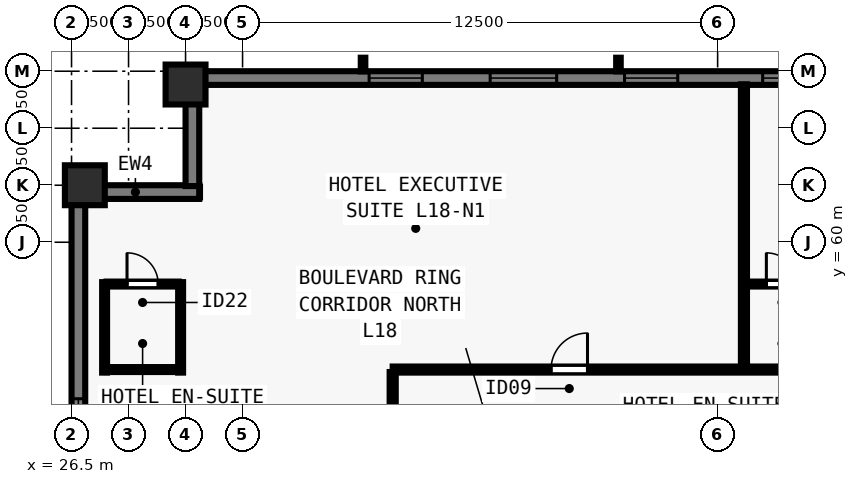
"""IFC4 building model, lengths in metres.
Left out: names, types, materials, properties, quantities, classifications, styles, units other than length and angle.
Written with IfcOpenShell. Run it as: python <this file> out.ifc"""

import sys

from ifc_helpers import new_model, si_unit, direction, frame, frame_2d, origin, origin_2d, place, context, subcontext, project, spatial, rectangle, extrude, element, fill, save


model = new_model("IFC4")
c1 = context("Model", 3, precision=1e-05, world=origin(), true_north=direction((0.0, 1.0)))
c2 = subcontext(c1, "Body", "Model", "MODEL_VIEW")
j1 = project(units=[si_unit("LENGTHUNIT", "METRE"), si_unit("PLANEANGLEUNIT", "RADIAN")], contexts=[c1])
p1 = place(None, origin())
s1 = spatial("IfcSite", under=j1, at=p1, CompositionType="ELEMENT")
p2 = place(p1, origin())
s2 = spatial("IfcBuilding", under=s1, at=p2, CompositionType="ELEMENT")
p3 = place(p2, frame((0.0, 0.0, 69.0)))
s3 = spatial("IfcBuildingStorey", under=s2, at=p3, CompositionType="ELEMENT", Elevation=69.0)
for number, where, z_axis, x_axis in (
    (1, (29.5, 64.15, 0.0), (0.0, 0.0, 1.0), (1.0, 0.0, 0.0)),
    (2, (26.85, 61.5, 0.0), (0.0, 0.0, 1.0), (0.0, 1.0, 0.0)),
):
    element("IfcColumn", number, at=place(p3, frame(where, z_axis=z_axis, x_axis=x_axis)), inside=s3, PredefinedType="COLUMN", context=c2, shape_type="SweptSolid", body=[
        extrude(rectangle(XDim=1.05, YDim=1.05, at=origin_2d()), origin(), (0.0, 0.0, 1.0), 3.5),
    ])
p4 = place(p3, frame((26.68, 16.5, 0.0), z_axis=(0.0, 0.0, 1.0), x_axis=(0.0, 1.0, 0.0)))
e3 = element("IfcWall", 3, at=p4, inside=s3, PredefinedType="SOLIDWALL", context=c2, shape_type="SweptSolid", body=[
    extrude(rectangle(XDim=44.662, YDim=0.36, at=frame_2d((22.331, 0.0))), origin(), (0.0, 0.0, 1.0), 3.28),
])
p5 = place(p4, frame((5.28, 0.0, 0.8)))
e4 = element("IfcOpeningElement", 4, at=p5, cuts=e3, PredefinedType="OPENING", context=c2, shape_type="SweptSolid", body=[
    extrude(rectangle(XDim=1.4, YDim=1.544, at=frame_2d((0.7, 0.772))), frame((0.0, 0.19, 0.0), z_axis=(0.0, -1.0, 0.0), x_axis=(1.0, 0.0, 0.0)), (0.0, 0.0, 1.0), 0.38),
])
p6 = place(p4, frame((8.015, 0.0, 0.8)))
e5 = element("IfcOpeningElement", 5, at=p6, cuts=e3, PredefinedType="OPENING", context=c2, shape_type="SweptSolid", body=[
    extrude(rectangle(XDim=1.75, YDim=1.544, at=frame_2d((0.875, 0.772))), frame((0.0, 0.19, 0.0), z_axis=(0.0, -1.0, 0.0), x_axis=(1.0, 0.0, 0.0)), (0.0, 0.0, 1.0), 0.38),
])
p7 = place(p4, frame((11.551, 0.0, 0.8)))
e6 = element("IfcOpeningElement", 6, at=p7, cuts=e3, PredefinedType="OPENING", context=c2, shape_type="SweptSolid", body=[
    extrude(rectangle(XDim=1.4, YDim=1.544, at=frame_2d((0.7, 0.772))), frame((0.0, 0.19, 0.0), z_axis=(0.0, -1.0, 0.0), x_axis=(1.0, 0.0, 0.0)), (0.0, 0.0, 1.0), 0.38),
])
p8 = place(p4, frame((14.736, 0.0, 0.8)))
e7 = element("IfcOpeningElement", 7, at=p8, cuts=e3, PredefinedType="OPENING", context=c2, shape_type="SweptSolid", body=[
    extrude(rectangle(XDim=1.75, YDim=1.544, at=frame_2d((0.875, 0.772))), frame((0.0, 0.19, 0.0), z_axis=(0.0, -1.0, 0.0), x_axis=(1.0, 0.0, 0.0)), (0.0, 0.0, 1.0), 0.38),
])
p9 = place(p4, frame((18.721, 0.0, 0.8)))
e8 = element("IfcOpeningElement", 8, at=p9, cuts=e3, PredefinedType="OPENING", context=c2, shape_type="SweptSolid", body=[
    extrude(rectangle(XDim=1.4, YDim=1.544, at=frame_2d((0.7, 0.772))), frame((0.0, 0.19, 0.0), z_axis=(0.0, -1.0, 0.0), x_axis=(1.0, 0.0, 0.0)), (0.0, 0.0, 1.0), 0.38),
])
p10 = place(p4, frame((22.706, 0.0, 0.8)))
e9 = element("IfcOpeningElement", 9, at=p10, cuts=e3, PredefinedType="OPENING", context=c2, shape_type="SweptSolid", body=[
    extrude(rectangle(XDim=1.75, YDim=1.544, at=frame_2d((0.875, 0.772))), frame((0.0, 0.19, 0.0), z_axis=(0.0, -1.0, 0.0), x_axis=(1.0, 0.0, 0.0)), (0.0, 0.0, 1.0), 0.38),
])
p11 = place(p4, frame((24.991, 0.0, 0.8)))
e10 = element("IfcOpeningElement", 10, at=p11, cuts=e3, PredefinedType="OPENING", context=c2, shape_type="SweptSolid", body=[
    extrude(rectangle(XDim=1.4, YDim=1.544, at=frame_2d((0.7, 0.772))), frame((0.0, 0.19, 0.0), z_axis=(0.0, -1.0, 0.0), x_axis=(1.0, 0.0, 0.0)), (0.0, 0.0, 1.0), 0.38),
])
p12 = place(p4, frame((28.177, 0.0, 0.8)))
e11 = element("IfcOpeningElement", 11, at=p12, cuts=e3, PredefinedType="OPENING", context=c2, shape_type="SweptSolid", body=[
    extrude(rectangle(XDim=1.75, YDim=1.544, at=frame_2d((0.875, 0.772))), frame((0.0, 0.19, 0.0), z_axis=(0.0, -1.0, 0.0), x_axis=(1.0, 0.0, 0.0)), (0.0, 0.0, 1.0), 0.38),
])
p13 = place(p4, frame((31.711, 0.0, 0.8)))
e12 = element("IfcOpeningElement", 12, at=p13, cuts=e3, PredefinedType="OPENING", context=c2, shape_type="SweptSolid", body=[
    extrude(rectangle(XDim=1.4, YDim=1.544, at=frame_2d((0.7, 0.772))), frame((0.0, 0.19, 0.0), z_axis=(0.0, -1.0, 0.0), x_axis=(1.0, 0.0, 0.0)), (0.0, 0.0, 1.0), 0.38),
])
p14 = place(p4, frame((34.897, 0.0, 0.8)))
e13 = element("IfcOpeningElement", 13, at=p14, cuts=e3, PredefinedType="OPENING", context=c2, shape_type="SweptSolid", body=[
    extrude(rectangle(XDim=1.75, YDim=1.544, at=frame_2d((0.875, 0.772))), frame((0.0, 0.19, 0.0), z_axis=(0.0, -1.0, 0.0), x_axis=(1.0, 0.0, 0.0)), (0.0, 0.0, 1.0), 0.38),
])
p15 = place(p4, frame((37.982, 0.0, 0.8)))
e14 = element("IfcOpeningElement", 14, at=p15, cuts=e3, PredefinedType="OPENING", context=c2, shape_type="SweptSolid", body=[
    extrude(rectangle(XDim=1.4, YDim=1.544, at=frame_2d((0.7, 0.772))), frame((0.0, 0.19, 0.0), z_axis=(0.0, -1.0, 0.0), x_axis=(1.0, 0.0, 0.0)), (0.0, 0.0, 1.0), 0.38),
])
p16 = place(p3, frame((26.5, 61.32, 0.0), z_axis=(0.0, 0.0, 1.0), x_axis=(1.0, 0.0, 0.0)))
e15 = element("IfcWall", 15, at=p16, inside=s3, PredefinedType="SOLIDWALL", context=c2, shape_type="SweptSolid", body=[
    extrude(rectangle(XDim=3.36, YDim=0.36, at=frame_2d((1.68, 0.0))), origin(), (0.0, 0.0, 1.0), 3.28),
])
p17 = place(p3, frame((29.68, 61.478, 0.0), z_axis=(0.0, 0.0, 1.0), x_axis=(0.0, 1.0, 0.0)))
e16 = element("IfcWall", 16, at=p17, inside=s3, PredefinedType="SOLIDWALL", context=c2, shape_type="SweptSolid", body=[
    extrude(rectangle(XDim=2.684, YDim=0.36, at=frame_2d((1.342, 0.0))), origin(), (0.0, 0.0, 1.0), 3.28),
])
p18 = place(p3, frame((29.5, 64.32, 0.0), z_axis=(0.0, 0.0, 1.0), x_axis=(1.0, 0.0, 0.0)))
e17 = element("IfcWall", 17, at=p18, inside=s3, PredefinedType="SOLIDWALL", context=c2, shape_type="SweptSolid", body=[
    extrude(rectangle(XDim=44.662, YDim=0.36, at=frame_2d((22.331, 0.0))), origin(), (0.0, 0.0, 1.0), 3.28),
])
p19 = place(p18, frame((4.83, 0.0, 0.8)))
e18 = element("IfcOpeningElement", 18, at=p19, cuts=e17, PredefinedType="OPENING", context=c2, shape_type="SweptSolid", body=[
    extrude(rectangle(XDim=1.4, YDim=1.544, at=frame_2d((0.7, 0.772))), frame((0.0, 0.19, 0.0), z_axis=(0.0, -1.0, 0.0), x_axis=(1.0, 0.0, 0.0)), (0.0, 0.0, 1.0), 0.38),
])
p20 = place(p18, frame((8.015, 0.0, 0.8)))
e19 = element("IfcOpeningElement", 19, at=p20, cuts=e17, PredefinedType="OPENING", context=c2, shape_type="SweptSolid", body=[
    extrude(rectangle(XDim=1.75, YDim=1.544, at=frame_2d((0.875, 0.772))), frame((0.0, 0.19, 0.0), z_axis=(0.0, -1.0, 0.0), x_axis=(1.0, 0.0, 0.0)), (0.0, 0.0, 1.0), 0.38),
])
p21 = place(p18, frame((11.551, 0.0, 0.8)))
e20 = element("IfcOpeningElement", 20, at=p21, cuts=e17, PredefinedType="OPENING", context=c2, shape_type="SweptSolid", body=[
    extrude(rectangle(XDim=1.4, YDim=1.544, at=frame_2d((0.7, 0.772))), frame((0.0, 0.19, 0.0), z_axis=(0.0, -1.0, 0.0), x_axis=(1.0, 0.0, 0.0)), (0.0, 0.0, 1.0), 0.38),
])
p22 = place(p18, frame((15.186, 0.0, 0.8)))
e21 = element("IfcOpeningElement", 21, at=p22, cuts=e17, PredefinedType="OPENING", context=c2, shape_type="SweptSolid", body=[
    extrude(rectangle(XDim=1.75, YDim=1.544, at=frame_2d((0.875, 0.772))), frame((0.0, 0.19, 0.0), z_axis=(0.0, -1.0, 0.0), x_axis=(1.0, 0.0, 0.0)), (0.0, 0.0, 1.0), 0.38),
])
p23 = place(p18, frame((18.721, 0.0, 0.8)))
e22 = element("IfcOpeningElement", 22, at=p23, cuts=e17, PredefinedType="OPENING", context=c2, shape_type="SweptSolid", body=[
    extrude(rectangle(XDim=1.4, YDim=1.544, at=frame_2d((0.7, 0.772))), frame((0.0, 0.19, 0.0), z_axis=(0.0, -1.0, 0.0), x_axis=(1.0, 0.0, 0.0)), (0.0, 0.0, 1.0), 0.38),
])
p24 = place(p18, frame((21.456, 0.0, 0.8)))
e23 = element("IfcOpeningElement", 23, at=p24, cuts=e17, PredefinedType="OPENING", context=c2, shape_type="SweptSolid", body=[
    extrude(rectangle(XDim=1.75, YDim=1.544, at=frame_2d((0.875, 0.772))), frame((0.0, 0.19, 0.0), z_axis=(0.0, -1.0, 0.0), x_axis=(1.0, 0.0, 0.0)), (0.0, 0.0, 1.0), 0.38),
])
p25 = place(p18, frame((24.991, 0.0, 0.8)))
e24 = element("IfcOpeningElement", 24, at=p25, cuts=e17, PredefinedType="OPENING", context=c2, shape_type="SweptSolid", body=[
    extrude(rectangle(XDim=1.4, YDim=1.544, at=frame_2d((0.7, 0.772))), frame((0.0, 0.19, 0.0), z_axis=(0.0, -1.0, 0.0), x_axis=(1.0, 0.0, 0.0)), (0.0, 0.0, 1.0), 0.38),
])
p26 = place(p18, frame((28.177, 0.0, 0.8)))
e25 = element("IfcOpeningElement", 25, at=p26, cuts=e17, PredefinedType="OPENING", context=c2, shape_type="SweptSolid", body=[
    extrude(rectangle(XDim=1.75, YDim=1.544, at=frame_2d((0.875, 0.772))), frame((0.0, 0.19, 0.0), z_axis=(0.0, -1.0, 0.0), x_axis=(1.0, 0.0, 0.0)), (0.0, 0.0, 1.0), 0.38),
])
p27 = place(p18, frame((31.711, 0.0, 0.8)))
e26 = element("IfcOpeningElement", 26, at=p27, cuts=e17, PredefinedType="OPENING", context=c2, shape_type="SweptSolid", body=[
    extrude(rectangle(XDim=1.4, YDim=1.544, at=frame_2d((0.7, 0.772))), frame((0.0, 0.19, 0.0), z_axis=(0.0, -1.0, 0.0), x_axis=(1.0, 0.0, 0.0)), (0.0, 0.0, 1.0), 0.38),
])
p28 = place(p18, frame((34.897, 0.0, 0.8)))
e27 = element("IfcOpeningElement", 27, at=p28, cuts=e17, PredefinedType="OPENING", context=c2, shape_type="SweptSolid", body=[
    extrude(rectangle(XDim=1.75, YDim=1.544, at=frame_2d((0.875, 0.772))), frame((0.0, 0.19, 0.0), z_axis=(0.0, -1.0, 0.0), x_axis=(1.0, 0.0, 0.0)), (0.0, 0.0, 1.0), 0.38),
])
p29 = place(p18, frame((38.432, 0.0, 0.8)))
e28 = element("IfcOpeningElement", 28, at=p29, cuts=e17, PredefinedType="OPENING", context=c2, shape_type="SweptSolid", body=[
    extrude(rectangle(XDim=1.4, YDim=1.544, at=frame_2d((0.7, 0.772))), frame((0.0, 0.19, 0.0), z_axis=(0.0, -1.0, 0.0), x_axis=(1.0, 0.0, 0.0)), (0.0, 0.0, 1.0), 0.38),
])
p30 = place(p3, frame((34.95, 56.65, 0.0), z_axis=(0.0, 0.0, 1.0), x_axis=(1.0, 0.0, 0.0)))
e29 = element("IfcWall", 29, at=p30, inside=s3, PredefinedType="PARTITIONING", context=c2, shape_type="SweptSolid", body=[
    extrude(rectangle(XDim=34.1, YDim=0.16, at=frame_2d((17.05, 0.0))), origin(), (0.0, 0.0, 1.0), 3.28),
])
p31 = place(p30, frame((4.166, 0.0, 0.0)))
e30 = element("IfcOpeningElement", 30, at=p31, cuts=e29, PredefinedType="OPENING", context=c2, shape_type="SweptSolid", body=[
    extrude(rectangle(XDim=0.96, YDim=2.15, at=frame_2d((0.48, 1.075))), frame((0.0, 0.09, 0.0), z_axis=(0.0, -1.0, 0.0), x_axis=(1.0, 0.0, 0.0)), (0.0, 0.0, 1.0), 0.18),
])
p32 = place(p30, frame((17.73, 0.0, 0.0)))
e31 = element("IfcOpeningElement", 31, at=p32, cuts=e29, PredefinedType="OPENING", context=c2, shape_type="SweptSolid", body=[
    extrude(rectangle(XDim=0.96, YDim=2.15, at=frame_2d((0.48, 1.075))), frame((0.0, 0.09, 0.0), z_axis=(0.0, -1.0, 0.0), x_axis=(1.0, 0.0, 0.0)), (0.0, 0.0, 1.0), 0.18),
])
p33 = place(p30, frame((30.134, 0.0, 0.0)))
e32 = element("IfcOpeningElement", 32, at=p33, cuts=e29, PredefinedType="OPENING", context=c2, shape_type="SweptSolid", body=[
    extrude(rectangle(XDim=0.96, YDim=2.15, at=frame_2d((0.48, 1.075))), frame((0.0, 0.09, 0.0), z_axis=(0.0, -1.0, 0.0), x_axis=(1.0, 0.0, 0.0)), (0.0, 0.0, 1.0), 0.18),
])
p34 = place(p3, frame((34.95, 21.415, 0.0), z_axis=(0.0, 0.0, 1.0), x_axis=(0.0, 1.0, 0.0)))
e33 = element("IfcWall", 33, at=p34, inside=s3, PredefinedType="PARTITIONING", context=c2, shape_type="SweptSolid", body=[
    extrude(rectangle(XDim=35.17, YDim=0.16, at=frame_2d((17.585, 0.0))), origin(), (0.0, 0.0, 1.0), 3.28),
])
p35 = place(p34, frame((9.414, 0.0, 0.0)))
e34 = element("IfcOpeningElement", 34, at=p35, cuts=e33, PredefinedType="OPENING", context=c2, shape_type="SweptSolid", body=[
    extrude(rectangle(XDim=0.96, YDim=2.15, at=frame_2d((0.48, 1.075))), frame((0.0, 0.09, 0.0), z_axis=(0.0, -1.0, 0.0), x_axis=(1.0, 0.0, 0.0)), (0.0, 0.0, 1.0), 0.18),
])
p36 = place(p34, frame((26.814, 0.0, 0.0)))
e35 = element("IfcOpeningElement", 35, at=p36, cuts=e33, PredefinedType="OPENING", context=c2, shape_type="SweptSolid", body=[
    extrude(rectangle(XDim=0.96, YDim=2.15, at=frame_2d((0.48, 1.075))), frame((0.0, 0.09, 0.0), z_axis=(0.0, -1.0, 0.0), x_axis=(1.0, 0.0, 0.0)), (0.0, 0.0, 1.0), 0.18),
])
for number, where, z_axis, x_axis in (
    (36, (27.37, 56.57, 0.0), (0.0, 0.0, 1.0), (0.0, 1.0, 0.0)),
    (37, (29.37, 56.57, 0.0), (0.0, 0.0, 1.0), (0.0, 1.0, 0.0)),
):
    element("IfcWall", number, at=place(p3, frame(where, z_axis=z_axis, x_axis=x_axis)), inside=s3, PredefinedType="PLUMBINGWALL", context=c2, shape_type="SweptSolid", body=[
        extrude(rectangle(XDim=2.38, YDim=0.13, at=frame_2d((1.19, 0.0))), origin(), (0.0, 0.0, 1.0), 3.28),
    ])
p37 = place(p3, frame((27.42, 58.9, 0.0), z_axis=(0.0, 0.0, 1.0), x_axis=(1.0, 0.0, 0.0)))
e38 = element("IfcWall", 38, at=p37, inside=s3, PredefinedType="PLUMBINGWALL", context=c2, shape_type="SweptSolid", body=[
    extrude(rectangle(XDim=1.9, YDim=0.13, at=frame_2d((0.95, 0.0))), origin(), (0.0, 0.0, 1.0), 3.28),
])
p38 = place(p37, frame((0.54, 0.0, 0.0)))
e39 = element("IfcOpeningElement", 39, at=p38, cuts=e38, PredefinedType="OPENING", context=c2, shape_type="SweptSolid", body=[
    extrude(rectangle(XDim=0.82, YDim=2.1, at=frame_2d((0.41, 1.05))), frame((0.0, 0.075, 0.0), z_axis=(0.0, -1.0, 0.0), x_axis=(1.0, 0.0, 0.0)), (0.0, 0.0, 1.0), 0.15),
])
p39 = place(p3, frame((27.42, 56.65, 0.0), z_axis=(0.0, 0.0, 1.0), x_axis=(1.0, 0.0, 0.0)))
e40 = element("IfcWall", 40, at=p39, inside=s3, PredefinedType="PLUMBINGWALL", context=c2, shape_type="SweptSolid", body=[
    extrude(rectangle(XDim=1.9, YDim=0.13, at=frame_2d((0.95, 0.0))), origin(), (0.0, 0.0, 1.0), 3.28),
])
p40 = place(p3, frame((44.192, 56.715, 0.0), z_axis=(0.0, 0.0, 1.0), x_axis=(0.0, 1.0, 0.0)))
e41 = element("IfcWall", 41, at=p40, inside=s3, PredefinedType="PARTITIONING", context=c2, shape_type="SweptSolid", body=[
    extrude(rectangle(XDim=7.44, YDim=0.16, at=frame_2d((3.72, 0.0))), origin(), (0.0, 0.0, 1.0), 3.28),
])
p41 = place(p3, frame((44.258, 58.9, 0.0), z_axis=(0.0, 0.0, 1.0), x_axis=(1.0, 0.0, 0.0)))
e42 = element("IfcWall", 42, at=p41, inside=s3, PredefinedType="PLUMBINGWALL", context=c2, shape_type="SweptSolid", body=[
    extrude(rectangle(XDim=1.885, YDim=0.13, at=frame_2d((0.942, 0.0))), origin(), (0.0, 0.0, 1.0), 3.28),
])
p42 = place(p41, frame((0.525, 0.0, 0.0)))
e43 = element("IfcOpeningElement", 43, at=p42, cuts=e42, PredefinedType="OPENING", context=c2, shape_type="SweptSolid", body=[
    extrude(rectangle(XDim=0.82, YDim=2.1, at=frame_2d((0.41, 1.05))), frame((0.0, 0.075, 0.0), z_axis=(0.0, -1.0, 0.0), x_axis=(1.0, 0.0, 0.0)), (0.0, 0.0, 1.0), 0.15),
])
p43 = place(p15, origin())
e44 = element("IfcWindow", 44, at=p43, inside=s3, PartitioningType="SINGLE_PANEL", PredefinedType="WINDOW", context=c2, shape_type="SweptSolid", body=[
    extrude(rectangle(XDim=1.4, YDim=1.544, at=frame_2d((0.7, 0.772))), frame((0.0, -0.05, 0.0), z_axis=(0.0, -1.0, 0.0), x_axis=(1.0, 0.0, 0.0)), (0.0, 0.0, 1.0), 0.06),
])
fill(e14, e44)
p44 = place(p19, origin())
e45 = element("IfcWindow", 45, at=p44, inside=s3, PartitioningType="SINGLE_PANEL", PredefinedType="WINDOW", context=c2, shape_type="SweptSolid", body=[
    extrude(rectangle(XDim=1.4, YDim=1.544, at=frame_2d((0.7, 0.772))), frame((0.0, -0.05, 0.0), z_axis=(0.0, -1.0, 0.0), x_axis=(1.0, 0.0, 0.0)), (0.0, 0.0, 1.0), 0.06),
])
fill(e18, e45)
p45 = place(p20, origin())
e46 = element("IfcWindow", 46, at=p45, inside=s3, PartitioningType="SINGLE_PANEL", PredefinedType="WINDOW", context=c2, shape_type="SweptSolid", body=[
    extrude(rectangle(XDim=1.75, YDim=1.544, at=frame_2d((0.875, 0.772))), frame((0.0, -0.05, 0.0), z_axis=(0.0, -1.0, 0.0), x_axis=(1.0, 0.0, 0.0)), (0.0, 0.0, 1.0), 0.06),
])
fill(e19, e46)
p46 = place(p21, origin())
e47 = element("IfcWindow", 47, at=p46, inside=s3, PartitioningType="SINGLE_PANEL", PredefinedType="WINDOW", context=c2, shape_type="SweptSolid", body=[
    extrude(rectangle(XDim=1.4, YDim=1.544, at=frame_2d((0.7, 0.772))), frame((0.0, -0.05, 0.0), z_axis=(0.0, -1.0, 0.0), x_axis=(1.0, 0.0, 0.0)), (0.0, 0.0, 1.0), 0.06),
])
fill(e20, e47)
p47 = place(p22, origin())
e48 = element("IfcWindow", 48, at=p47, inside=s3, PartitioningType="SINGLE_PANEL", PredefinedType="WINDOW", context=c2, shape_type="SweptSolid", body=[
    extrude(rectangle(XDim=1.75, YDim=1.544, at=frame_2d((0.875, 0.772))), frame((0.0, -0.05, 0.0), z_axis=(0.0, -1.0, 0.0), x_axis=(1.0, 0.0, 0.0)), (0.0, 0.0, 1.0), 0.06),
])
fill(e21, e48)
p48 = place(p38, origin())
e49 = element("IfcDoor", 49, at=p48, inside=s3, OperationType="SINGLE_SWING_LEFT", PredefinedType="DOOR", context=c2, shape_type="SweptSolid", body=[
    extrude(rectangle(XDim=0.82, YDim=2.1, at=frame_2d((0.41, 1.05))), frame((0.0, 0.025, 0.0), z_axis=(0.0, -1.0, 0.0), x_axis=(1.0, 0.0, 0.0)), (0.0, 0.0, 1.0), 0.05),
])
fill(e39, e49)
p49 = place(p31, origin())
e50 = element("IfcDoor", 50, at=p49, inside=s3, OperationType="SINGLE_SWING_RIGHT", PredefinedType="DOOR", context=c2, shape_type="SweptSolid", body=[
    extrude(rectangle(XDim=0.96, YDim=2.15, at=frame_2d((0.48, 1.075))), frame((0.0, 0.025, 0.0), z_axis=(0.0, -1.0, 0.0), x_axis=(1.0, 0.0, 0.0)), (0.0, 0.0, 1.0), 0.05),
])
fill(e30, e50)
p50 = place(p42, origin())
e51 = element("IfcDoor", 51, at=p50, inside=s3, OperationType="SINGLE_SWING_LEFT", PredefinedType="DOOR", context=c2, shape_type="SweptSolid", body=[
    extrude(rectangle(XDim=0.82, YDim=2.1, at=frame_2d((0.41, 1.05))), frame((0.0, 0.025, 0.0), z_axis=(0.0, -1.0, 0.0), x_axis=(1.0, 0.0, 0.0)), (0.0, 0.0, 1.0), 0.05),
])
fill(e43, e51)
save(model, sys.argv[1])
